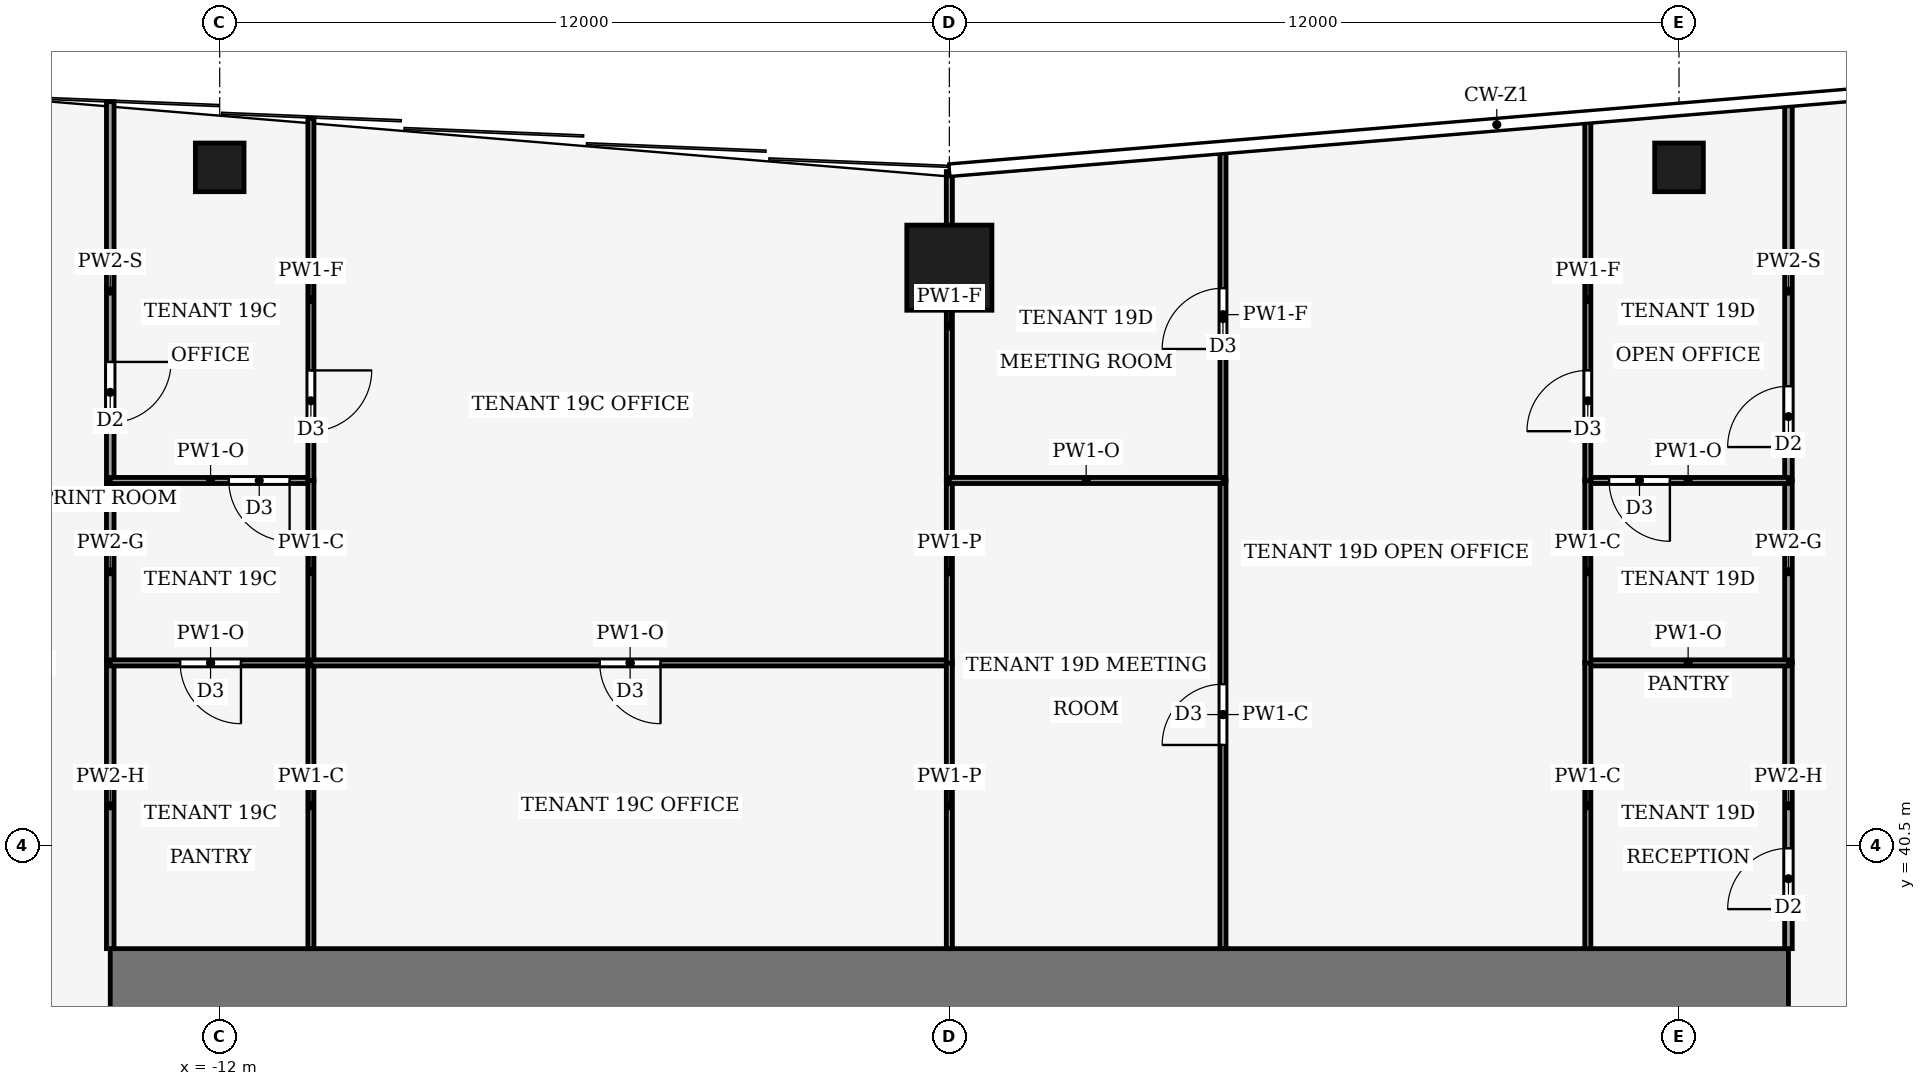
"""IFC4 building model, lengths in metres.
Left out: names, types, materials, properties, quantities, classifications, styles, units other than length and angle.
Written with IfcOpenShell. Run it as: python <this file> out.ifc"""

import sys

from ifc_helpers import new_model, si_unit, direction, frame, frame_2d, origin, origin_2d, place, context, subcontext, project, spatial, rectangle, hollow_rectangle, extrude, element, fill, save


model = new_model("IFC4")
c1 = context("Model", 3, precision=1e-05, world=origin(), true_north=direction((0.0, 1.0)))
c2 = subcontext(c1, "Body", "Model", "MODEL_VIEW")
j1 = project(units=[si_unit("LENGTHUNIT", "METRE"), si_unit("PLANEANGLEUNIT", "RADIAN")], contexts=[c1])
p1 = place(None, origin())
s1 = spatial("IfcSite", under=j1, at=p1, CompositionType="ELEMENT")
p2 = place(p1, origin())
s2 = spatial("IfcBuilding", under=s1, at=p2, CompositionType="ELEMENT")
p3 = place(p2, frame((0.0, 0.0, 86.0)))
s3 = spatial("IfcBuildingStorey", under=s2, at=p3, CompositionType="ELEMENT", Elevation=86.0)
p4 = place(p3, frame((-13.8, 38.2, -0.13), z_axis=(0.0, 0.0, 1.0), x_axis=(1.0, 0.0, 0.0)))
e1 = element("IfcWall", 1, at=p4, inside=s3, PredefinedType="SHEAR", context=c2, shape_type="SweptSolid", body=[
    extrude(rectangle(XDim=27.6, YDim=1.2, at=frame_2d((13.8, 0.0))), origin(), (0.0, 0.0, 1.0), 4.0),
])
p5 = place(p3, frame((0.0, 50.0, 0.0), z_axis=(0.0, 0.0, 1.0), x_axis=(1.0, 0.0, 0.0)))
e2 = element("IfcColumn", 2, at=p5, inside=s3, PredefinedType="COLUMN", context=c2, shape_type="SweptSolid", body=[
    extrude(hollow_rectangle(XDim=1.4, YDim=1.4, WallThickness=0.08, at=origin_2d()), origin(), (0.0, 0.0, 1.0), 4.0),
])
for number, where, z_axis, x_axis in (
    (3, (-12.0, 51.65, 0.0), (0.0, 0.0, 1.0), (1.0, 0.0, 0.0)),
    (4, (12.0, 51.65, 0.0), (0.0, 0.0, 1.0), (1.0, 0.0, 0.0)),
):
    element("IfcColumn", number, at=place(p3, frame(where, z_axis=z_axis, x_axis=x_axis)), inside=s3, PredefinedType="COLUMN", context=c2, shape_type="SweptSolid", body=[
        extrude(hollow_rectangle(XDim=0.8, YDim=0.8, WallThickness=0.04, at=origin_2d()), origin(), (0.0, 0.0, 1.0), 4.0),
    ])
p6 = place(p3, frame((-13.8, 38.8, 0.0), z_axis=(0.0, 0.0, 1.0), x_axis=(0.0, 1.0, 0.0)))
e5 = element("IfcWall", 5, at=p6, inside=s3, PredefinedType="PARTITIONING", context=c2, shape_type="SweptSolid", body=[
    extrude(rectangle(XDim=4.7, YDim=0.125, at=frame_2d((2.35, 0.0))), origin(), (0.0, 0.0, 1.0), 3.14),
])
p7 = place(p3, frame((-13.8, 43.5, 0.0), z_axis=(0.0, 0.0, 1.0), x_axis=(0.0, 1.0, 0.0)))
e6 = element("IfcWall", 6, at=p7, inside=s3, PredefinedType="PARTITIONING", context=c2, shape_type="SweptSolid", body=[
    extrude(rectangle(XDim=3.0, YDim=0.125, at=frame_2d((1.5, 0.0))), origin(), (0.0, 0.0, 1.0), 3.87),
])
p8 = place(p3, frame((-13.8, 52.73, 0.0), z_axis=(0.0, 0.0, 1.0), x_axis=(0.0, -1.0, 0.0)))
e7 = element("IfcWall", 7, at=p8, inside=s3, PredefinedType="PARTITIONING", context=c2, shape_type="SweptSolid", body=[
    extrude(rectangle(XDim=6.23, YDim=0.125, at=frame_2d((3.115, 0.0))), origin(), (0.0, 0.0, 1.0), 3.04),
])
p9 = place(p8, frame((4.28, 0.0, 0.0)))
e8 = element("IfcOpeningElement", 8, at=p9, cuts=e7, PredefinedType="OPENING", context=c2, shape_type="SweptSolid", body=[
    extrude(rectangle(XDim=1.0, YDim=2.1, at=frame_2d((0.5, 1.05))), frame((0.0, 0.073, 0.0), z_axis=(0.0, -1.0, 0.0), x_axis=(1.0, 0.0, 0.0)), (0.0, 0.0, 1.0), 0.145),
])
p10 = place(p3, frame((13.8, 38.8, 0.0), z_axis=(0.0, 0.0, 1.0), x_axis=(0.0, 1.0, 0.0)))
e9 = element("IfcWall", 9, at=p10, inside=s3, PredefinedType="PARTITIONING", context=c2, shape_type="SweptSolid", body=[
    extrude(rectangle(XDim=4.7, YDim=0.125, at=frame_2d((2.35, 0.0))), origin(), (0.0, 0.0, 1.0), 3.14),
])
p11 = place(p10, frame((0.65, 0.0, 0.0)))
e10 = element("IfcOpeningElement", 10, at=p11, cuts=e9, PredefinedType="OPENING", context=c2, shape_type="SweptSolid", body=[
    extrude(rectangle(XDim=1.0, YDim=2.1, at=frame_2d((0.5, 1.05))), frame((0.0, 0.073, 0.0), z_axis=(0.0, -1.0, 0.0), x_axis=(1.0, 0.0, 0.0)), (0.0, 0.0, 1.0), 0.145),
])
p12 = place(p3, frame((13.8, 46.5, 0.0), z_axis=(0.0, 0.0, 1.0), x_axis=(0.0, -1.0, 0.0)))
e11 = element("IfcWall", 11, at=p12, inside=s3, PredefinedType="PARTITIONING", context=c2, shape_type="SweptSolid", body=[
    extrude(rectangle(XDim=3.0, YDim=0.125, at=frame_2d((1.5, 0.0))), origin(), (0.0, 0.0, 1.0), 3.87),
])
p13 = place(p3, frame((13.8, 46.5, 0.0), z_axis=(0.0, 0.0, 1.0), x_axis=(0.0, 1.0, 0.0)))
e12 = element("IfcWall", 12, at=p13, inside=s3, PredefinedType="PARTITIONING", context=c2, shape_type="SweptSolid", body=[
    extrude(rectangle(XDim=6.23, YDim=0.125, at=frame_2d((3.115, 0.0))), origin(), (0.0, 0.0, 1.0), 3.04),
])
p14 = place(p13, frame((0.55, 0.0, 0.0)))
e13 = element("IfcOpeningElement", 13, at=p14, cuts=e12, PredefinedType="OPENING", context=c2, shape_type="SweptSolid", body=[
    extrude(rectangle(XDim=1.0, YDim=2.1, at=frame_2d((0.5, 1.05))), frame((0.0, 0.073, 0.0), z_axis=(0.0, -1.0, 0.0), x_axis=(1.0, 0.0, 0.0)), (0.0, 0.0, 1.0), 0.145),
])
p15 = place(p3, frame((-10.5, 43.5, 0.0), z_axis=(0.0, 0.0, 1.0), x_axis=(-1.0, 0.0, 0.0)))
e14 = element("IfcWall", 14, at=p15, inside=s3, PredefinedType="PARTITIONING", context=c2, shape_type="SweptSolid", body=[
    extrude(rectangle(XDim=3.3, YDim=0.1, at=frame_2d((1.65, 0.0))), origin(), (0.0, 0.0, 1.0), 3.39),
])
p16 = place(p15, frame((1.15, 0.0, 0.0)))
e15 = element("IfcOpeningElement", 15, at=p16, cuts=e14, PredefinedType="OPENING", context=c2, shape_type="SweptSolid", body=[
    extrude(rectangle(XDim=1.0, YDim=2.1, at=frame_2d((0.5, 1.05))), frame((0.0, 0.06, 0.0), z_axis=(0.0, -1.0, 0.0), x_axis=(1.0, 0.0, 0.0)), (0.0, 0.0, 1.0), 0.12),
])
p17 = place(p3, frame((-10.5, 38.8, 0.0), z_axis=(0.0, 0.0, 1.0), x_axis=(0.0, 1.0, 0.0)))
e16 = element("IfcWall", 16, at=p17, inside=s3, PredefinedType="PARTITIONING", context=c2, shape_type="SweptSolid", body=[
    extrude(rectangle(XDim=4.7, YDim=0.1, at=frame_2d((2.35, 0.0))), origin(), (0.0, 0.0, 1.0), 3.87),
])
p18 = place(p3, frame((-10.5, 46.5, 0.0), z_axis=(0.0, 0.0, 1.0), x_axis=(-1.0, 0.0, 0.0)))
e17 = element("IfcWall", 17, at=p18, inside=s3, PredefinedType="PARTITIONING", context=c2, shape_type="SweptSolid", body=[
    extrude(rectangle(XDim=3.3, YDim=0.1, at=frame_2d((1.65, 0.0))), origin(), (0.0, 0.0, 1.0), 3.39),
])
p19 = place(p18, frame((0.35, 0.0, 0.0)))
e18 = element("IfcOpeningElement", 18, at=p19, cuts=e17, PredefinedType="OPENING", context=c2, shape_type="SweptSolid", body=[
    extrude(rectangle(XDim=1.0, YDim=2.1, at=frame_2d((0.5, 1.05))), frame((0.0, 0.06, 0.0), z_axis=(0.0, -1.0, 0.0), x_axis=(1.0, 0.0, 0.0)), (0.0, 0.0, 1.0), 0.12),
])
p20 = place(p3, frame((-10.5, 43.5, 0.0), z_axis=(0.0, 0.0, 1.0), x_axis=(0.0, 1.0, 0.0)))
e19 = element("IfcWall", 19, at=p20, inside=s3, PredefinedType="PARTITIONING", context=c2, shape_type="SweptSolid", body=[
    extrude(rectangle(XDim=3.004, YDim=0.1, at=frame_2d((1.502, 0.0))), origin(), (0.0, 0.0, 1.0), 3.87),
])
p21 = place(p3, frame((-10.5, 52.455, 0.0), z_axis=(0.0, 0.0, 1.0), x_axis=(0.0, -1.0, 0.0)))
e20 = element("IfcWall", 20, at=p21, inside=s3, PredefinedType="PARTITIONING", context=c2, shape_type="SweptSolid", body=[
    extrude(rectangle(XDim=5.959, YDim=0.1, at=frame_2d((2.979, 0.0))), origin(), (0.0, 0.0, 1.0), 3.04),
])
p22 = place(p21, frame((4.145, 0.0, 0.0)))
e21 = element("IfcOpeningElement", 21, at=p22, cuts=e20, PredefinedType="OPENING", context=c2, shape_type="SweptSolid", body=[
    extrude(rectangle(XDim=1.0, YDim=2.1, at=frame_2d((0.5, 1.05))), frame((0.0, 0.06, 0.0), z_axis=(0.0, -1.0, 0.0), x_axis=(1.0, 0.0, 0.0)), (0.0, 0.0, 1.0), 0.12),
])
p23 = place(p3, frame((0.0, 43.5, 0.0), z_axis=(0.0, 0.0, 1.0), x_axis=(-1.0, 0.0, 0.0)))
e22 = element("IfcWall", 22, at=p23, inside=s3, PredefinedType="PARTITIONING", context=c2, shape_type="SweptSolid", body=[
    extrude(rectangle(XDim=10.5, YDim=0.1, at=frame_2d((5.25, 0.0))), origin(), (0.0, 0.0, 1.0), 3.39),
])
p24 = place(p23, frame((4.75, 0.0, 0.0)))
e23 = element("IfcOpeningElement", 23, at=p24, cuts=e22, PredefinedType="OPENING", context=c2, shape_type="SweptSolid", body=[
    extrude(rectangle(XDim=1.0, YDim=2.1, at=frame_2d((0.5, 1.05))), frame((0.0, 0.06, 0.0), z_axis=(0.0, -1.0, 0.0), x_axis=(1.0, 0.0, 0.0)), (0.0, 0.0, 1.0), 0.12),
])
p25 = place(p3, frame((0.0, 38.8, 0.0), z_axis=(0.0, 0.0, 1.0), x_axis=(0.0, 1.0, 0.0)))
e24 = element("IfcWall", 24, at=p25, inside=s3, PredefinedType="PARTITIONING", context=c2, shape_type="SweptSolid", body=[
    extrude(rectangle(XDim=4.704, YDim=0.1, at=frame_2d((2.352, 0.0))), origin(), (0.0, 0.0, 1.0), 3.44),
])
p26 = place(p3, frame((0.0, 43.496, 0.0), z_axis=(0.0, 0.0, 1.0), x_axis=(0.0, 1.0, 0.0)))
e25 = element("IfcWall", 25, at=p26, inside=s3, PredefinedType="PARTITIONING", context=c2, shape_type="SweptSolid", body=[
    extrude(rectangle(XDim=3.004, YDim=0.1, at=frame_2d((1.502, 0.0))), origin(), (0.0, 0.0, 1.0), 3.44),
])
p27 = place(p3, frame((0.0, 46.5, 0.0), z_axis=(0.0, 0.0, 1.0), x_axis=(0.0, 1.0, 0.0)))
e26 = element("IfcWall", 26, at=p27, inside=s3, PredefinedType="PARTITIONING", context=c2, shape_type="SweptSolid", body=[
    extrude(rectangle(XDim=5.08, YDim=0.1, at=frame_2d((2.54, 0.0))), origin(), (0.0, 0.0, 1.0), 3.04),
])
p28 = place(p3, frame((13.8, 43.5, 0.0), z_axis=(0.0, 0.0, 1.0), x_axis=(-1.0, 0.0, 0.0)))
e27 = element("IfcWall", 27, at=p28, inside=s3, PredefinedType="PARTITIONING", context=c2, shape_type="SweptSolid", body=[
    extrude(rectangle(XDim=3.3, YDim=0.1, at=frame_2d((1.65, 0.0))), origin(), (0.0, 0.0, 1.0), 3.39),
])
p29 = place(p3, frame((10.5, 43.504, 0.0), z_axis=(0.0, 0.0, 1.0), x_axis=(0.0, -1.0, 0.0)))
e28 = element("IfcWall", 28, at=p29, inside=s3, PredefinedType="PARTITIONING", context=c2, shape_type="SweptSolid", body=[
    extrude(rectangle(XDim=4.704, YDim=0.1, at=frame_2d((2.352, 0.0))), origin(), (0.0, 0.0, 1.0), 3.87),
])
p30 = place(p3, frame((13.8, 46.5, 0.0), z_axis=(0.0, 0.0, 1.0), x_axis=(-1.0, 0.0, 0.0)))
e29 = element("IfcWall", 29, at=p30, inside=s3, PredefinedType="PARTITIONING", context=c2, shape_type="SweptSolid", body=[
    extrude(rectangle(XDim=3.3, YDim=0.1, at=frame_2d((1.65, 0.0))), origin(), (0.0, 0.0, 1.0), 3.39),
])
p31 = place(p30, frame((1.95, 0.0, 0.0)))
e30 = element("IfcOpeningElement", 30, at=p31, cuts=e29, PredefinedType="OPENING", context=c2, shape_type="SweptSolid", body=[
    extrude(rectangle(XDim=1.0, YDim=2.1, at=frame_2d((0.5, 1.05))), frame((0.0, 0.06, 0.0), z_axis=(0.0, -1.0, 0.0), x_axis=(1.0, 0.0, 0.0)), (0.0, 0.0, 1.0), 0.12),
])
p32 = place(p3, frame((10.5, 46.504, 0.0), z_axis=(0.0, 0.0, 1.0), x_axis=(0.0, -1.0, 0.0)))
e31 = element("IfcWall", 31, at=p32, inside=s3, PredefinedType="PARTITIONING", context=c2, shape_type="SweptSolid", body=[
    extrude(rectangle(XDim=3.008, YDim=0.1, at=frame_2d((1.504, 0.0))), origin(), (0.0, 0.0, 1.0), 3.87),
])
p33 = place(p3, frame((10.5, 46.496, 0.0), z_axis=(0.0, 0.0, 1.0), x_axis=(0.0, 1.0, 0.0)))
e32 = element("IfcWall", 32, at=p33, inside=s3, PredefinedType="PARTITIONING", context=c2, shape_type="SweptSolid", body=[
    extrude(rectangle(XDim=5.959, YDim=0.1, at=frame_2d((2.979, 0.0))), origin(), (0.0, 0.0, 1.0), 3.04),
])
p34 = place(p33, frame((0.814, 0.0, 0.0)))
e33 = element("IfcOpeningElement", 33, at=p34, cuts=e32, PredefinedType="OPENING", context=c2, shape_type="SweptSolid", body=[
    extrude(rectangle(XDim=1.0, YDim=2.1, at=frame_2d((0.5, 1.05))), frame((0.0, 0.06, 0.0), z_axis=(0.0, -1.0, 0.0), x_axis=(1.0, 0.0, 0.0)), (0.0, 0.0, 1.0), 0.12),
])
p35 = place(p3, frame((4.5, 38.8, 0.0), z_axis=(0.0, 0.0, 1.0), x_axis=(0.0, 1.0, 0.0)))
e34 = element("IfcWall", 34, at=p35, inside=s3, PredefinedType="PARTITIONING", context=c2, shape_type="SweptSolid", body=[
    extrude(rectangle(XDim=7.7, YDim=0.1, at=frame_2d((3.85, 0.0))), origin(), (0.0, 0.0, 1.0), 3.87),
])
p36 = place(p35, frame((3.35, 0.0, 0.0)))
e35 = element("IfcOpeningElement", 35, at=p36, cuts=e34, PredefinedType="OPENING", context=c2, shape_type="SweptSolid", body=[
    extrude(rectangle(XDim=1.0, YDim=2.1, at=frame_2d((0.5, 1.05))), frame((0.0, 0.06, 0.0), z_axis=(0.0, -1.0, 0.0), x_axis=(1.0, 0.0, 0.0)), (0.0, 0.0, 1.0), 0.12),
])
p37 = place(p3, frame((4.5, 46.5, 0.0), z_axis=(0.0, 0.0, 1.0), x_axis=(0.0, 1.0, 0.0)))
e36 = element("IfcWall", 36, at=p37, inside=s3, PredefinedType="PARTITIONING", context=c2, shape_type="SweptSolid", body=[
    extrude(rectangle(XDim=5.455, YDim=0.1, at=frame_2d((2.728, 0.0))), origin(), (0.0, 0.0, 1.0), 3.04),
])
p38 = place(p37, frame((2.162, 0.0, 0.0)))
e37 = element("IfcOpeningElement", 37, at=p38, cuts=e36, PredefinedType="OPENING", context=c2, shape_type="SweptSolid", body=[
    extrude(rectangle(XDim=1.0, YDim=2.1, at=frame_2d((0.5, 1.05))), frame((0.0, 0.06, 0.0), z_axis=(0.0, -1.0, 0.0), x_axis=(1.0, 0.0, 0.0)), (0.0, 0.0, 1.0), 0.12),
])
p39 = place(p3, frame((4.5, 46.5, 0.0), z_axis=(0.0, 0.0, 1.0), x_axis=(-1.0, 0.0, 0.0)))
e38 = element("IfcWall", 38, at=p39, inside=s3, PredefinedType="PARTITIONING", context=c2, shape_type="SweptSolid", body=[
    extrude(rectangle(XDim=4.5, YDim=0.1, at=frame_2d((2.25, 0.0))), origin(), (0.0, 0.0, 1.0), 3.39),
])
p40 = place(p9, origin())
e39 = element("IfcDoor", 39, at=p40, inside=s3, OperationType="SINGLE_SWING_RIGHT", PredefinedType="DOOR", context=c2, shape_type="SweptSolid", body=[
    extrude(rectangle(XDim=1.0, YDim=2.1, at=frame_2d((0.5, 1.05))), frame((0.0, 0.025, 0.0), z_axis=(0.0, -1.0, 0.0), x_axis=(1.0, 0.0, 0.0)), (0.0, 0.0, 1.0), 0.05),
])
fill(e8, e39)
p41 = place(p11, origin())
e40 = element("IfcDoor", 40, at=p41, inside=s3, OperationType="SINGLE_SWING_LEFT", PredefinedType="DOOR", context=c2, shape_type="SweptSolid", body=[
    extrude(rectangle(XDim=1.0, YDim=2.1, at=frame_2d((0.5, 1.05))), frame((0.0, 0.025, 0.0), z_axis=(0.0, -1.0, 0.0), x_axis=(1.0, 0.0, 0.0)), (0.0, 0.0, 1.0), 0.05),
])
fill(e10, e40)
p42 = place(p14, origin())
e41 = element("IfcDoor", 41, at=p42, inside=s3, OperationType="SINGLE_SWING_LEFT", PredefinedType="DOOR", context=c2, shape_type="SweptSolid", body=[
    extrude(rectangle(XDim=1.0, YDim=2.1, at=frame_2d((0.5, 1.05))), frame((0.0, 0.025, 0.0), z_axis=(0.0, -1.0, 0.0), x_axis=(1.0, 0.0, 0.0)), (0.0, 0.0, 1.0), 0.05),
])
fill(e13, e41)
p43 = place(p16, origin())
e42 = element("IfcDoor", 42, at=p43, inside=s3, OperationType="SINGLE_SWING_LEFT", PredefinedType="DOOR", context=c2, shape_type="SweptSolid", body=[
    extrude(rectangle(XDim=1.0, YDim=2.1, at=frame_2d((0.5, 1.05))), frame((0.0, 0.025, 0.0), z_axis=(0.0, -1.0, 0.0), x_axis=(1.0, 0.0, 0.0)), (0.0, 0.0, 1.0), 0.05),
])
fill(e15, e42)
p44 = place(p19, origin())
e43 = element("IfcDoor", 43, at=p44, inside=s3, OperationType="SINGLE_SWING_LEFT", PredefinedType="DOOR", context=c2, shape_type="SweptSolid", body=[
    extrude(rectangle(XDim=1.0, YDim=2.1, at=frame_2d((0.5, 1.05))), frame((0.0, 0.025, 0.0), z_axis=(0.0, -1.0, 0.0), x_axis=(1.0, 0.0, 0.0)), (0.0, 0.0, 1.0), 0.05),
])
fill(e18, e43)
p45 = place(p22, origin())
e44 = element("IfcDoor", 44, at=p45, inside=s3, OperationType="SINGLE_SWING_RIGHT", PredefinedType="DOOR", context=c2, shape_type="SweptSolid", body=[
    extrude(rectangle(XDim=1.0, YDim=2.1, at=frame_2d((0.5, 1.05))), frame((0.0, 0.025, 0.0), z_axis=(0.0, -1.0, 0.0), x_axis=(1.0, 0.0, 0.0)), (0.0, 0.0, 1.0), 0.05),
])
fill(e21, e44)
p46 = place(p24, origin())
e45 = element("IfcDoor", 45, at=p46, inside=s3, OperationType="SINGLE_SWING_RIGHT", PredefinedType="DOOR", context=c2, shape_type="SweptSolid", body=[
    extrude(rectangle(XDim=1.0, YDim=2.1, at=frame_2d((0.5, 1.05))), frame((0.0, 0.025, 0.0), z_axis=(0.0, -1.0, 0.0), x_axis=(1.0, 0.0, 0.0)), (0.0, 0.0, 1.0), 0.05),
])
fill(e23, e45)
p47 = place(p31, origin())
e46 = element("IfcDoor", 46, at=p47, inside=s3, OperationType="SINGLE_SWING_RIGHT", PredefinedType="DOOR", context=c2, shape_type="SweptSolid", body=[
    extrude(rectangle(XDim=1.0, YDim=2.1, at=frame_2d((0.5, 1.05))), frame((0.0, 0.025, 0.0), z_axis=(0.0, -1.0, 0.0), x_axis=(1.0, 0.0, 0.0)), (0.0, 0.0, 1.0), 0.05),
])
fill(e30, e46)
p48 = place(p34, origin())
e47 = element("IfcDoor", 47, at=p48, inside=s3, OperationType="SINGLE_SWING_LEFT", PredefinedType="DOOR", context=c2, shape_type="SweptSolid", body=[
    extrude(rectangle(XDim=1.0, YDim=2.1, at=frame_2d((0.5, 1.05))), frame((0.0, 0.025, 0.0), z_axis=(0.0, -1.0, 0.0), x_axis=(1.0, 0.0, 0.0)), (0.0, 0.0, 1.0), 0.05),
])
fill(e33, e47)
p49 = place(p36, origin())
e48 = element("IfcDoor", 48, at=p49, inside=s3, OperationType="SINGLE_SWING_LEFT", PredefinedType="DOOR", context=c2, shape_type="SweptSolid", body=[
    extrude(rectangle(XDim=1.0, YDim=2.1, at=frame_2d((0.5, 1.05))), frame((0.0, 0.025, 0.0), z_axis=(0.0, -1.0, 0.0), x_axis=(1.0, 0.0, 0.0)), (0.0, 0.0, 1.0), 0.05),
])
fill(e35, e48)
p50 = place(p38, origin())
e49 = element("IfcDoor", 49, at=p50, inside=s3, OperationType="SINGLE_SWING_LEFT", PredefinedType="DOOR", context=c2, shape_type="SweptSolid", body=[
    extrude(rectangle(XDim=1.0, YDim=2.1, at=frame_2d((0.5, 1.05))), frame((0.0, 0.025, 0.0), z_axis=(0.0, -1.0, 0.0), x_axis=(1.0, 0.0, 0.0)), (0.0, 0.0, 1.0), 0.05),
])
fill(e37, e49)
save(model, sys.argv[1])
